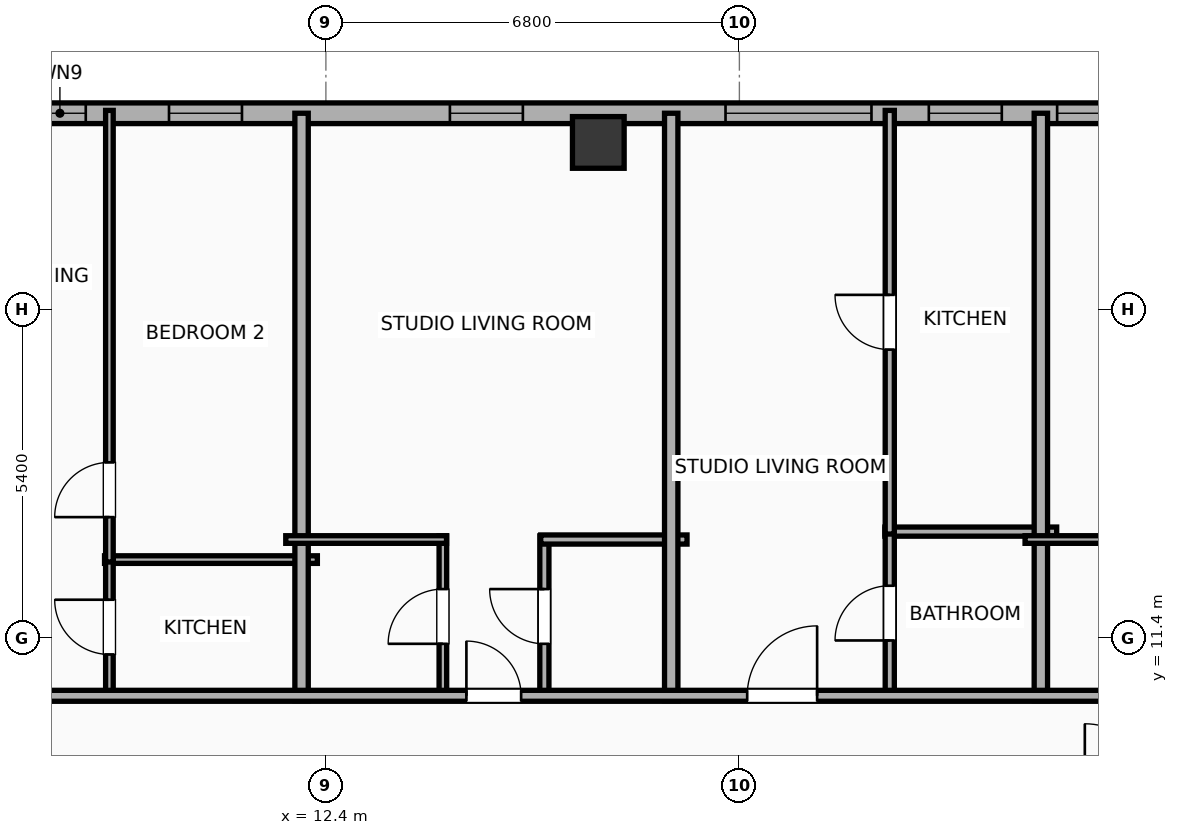
"""IFC4 building model, lengths in metres.
Left out: names, types, materials, properties, quantities, classifications, styles, units other than length and angle.
Written with IfcOpenShell. Run it as: python <this file> out.ifc"""

import sys

from ifc_helpers import new_model, si_unit, direction, frame, frame_2d, origin, origin_2d, place, context, subcontext, project, spatial, rectangle, hollow_rectangle, extrude, element, fill, save


model = new_model("IFC4")
c1 = context("Model", 3, precision=1e-05, world=origin(), true_north=direction((0.0, 1.0)))
c2 = subcontext(c1, "Body", "Model", "MODEL_VIEW")
j1 = project(units=[si_unit("LENGTHUNIT", "METRE"), si_unit("PLANEANGLEUNIT", "RADIAN")], contexts=[c1])
p1 = place(None, origin())
s1 = spatial("IfcSite", under=j1, at=p1, CompositionType="ELEMENT")
p2 = place(p1, origin())
s2 = spatial("IfcBuilding", under=s1, at=p2, CompositionType="ELEMENT")
p3 = place(p2, frame((0.0, 0.0, 227.5)))
s3 = spatial("IfcBuildingStorey", under=s2, at=p3, CompositionType="ELEMENT", Elevation=227.5)
p4 = place(p3, frame((16.88, 19.55, 0.0), z_axis=(0.0, 0.0, 1.0), x_axis=(1.0, 0.0, 0.0)))
e1 = element("IfcColumn", 1, at=p4, inside=s3, PredefinedType="COLUMN", context=c2, shape_type="SweptSolid", body=[
    extrude(hollow_rectangle(XDim=0.85, YDim=0.85, WallThickness=0.028, at=origin_2d()), origin(), (0.0, 0.0, 1.0), 3.9),
])
p5 = place(p3, frame((-22.783, 20.03, 0.0), z_axis=(0.0, 0.0, 1.0), x_axis=(1.0, 0.0, 0.0)))
e2 = element("IfcWall", 2, at=p5, inside=s3, PredefinedType="ELEMENTEDWALL", context=c2, shape_type="SweptSolid", body=[
    extrude(rectangle(XDim=49.566, YDim=0.34, at=frame_2d((24.783, 0.0))), origin(), (0.0, 0.0, 1.0), 3.65),
])
p6 = place(p5, frame((25.233, 0.0, 0.75)))
e3 = element("IfcOpeningElement", 3, at=p6, cuts=e2, PredefinedType="OPENING", context=c2, shape_type="SweptSolid", body=[
    extrude(rectangle(XDim=2.4, YDim=2.1, at=frame_2d((1.2, 1.05))), frame((0.0, 0.18, 0.0), z_axis=(0.0, -1.0, 0.0), x_axis=(1.0, 0.0, 0.0)), (0.0, 0.0, 1.0), 0.36),
])
p7 = place(p5, frame((41.756, 0.0, 0.75)))
e4 = element("IfcOpeningElement", 4, at=p7, cuts=e2, PredefinedType="OPENING", context=c2, shape_type="SweptSolid", body=[
    extrude(rectangle(XDim=2.4, YDim=2.1, at=frame_2d((1.2, 1.05))), frame((0.0, 0.18, 0.0), z_axis=(0.0, -1.0, 0.0), x_axis=(1.0, 0.0, 0.0)), (0.0, 0.0, 1.0), 0.36),
])
p8 = place(p5, frame((1.637, 0.0, 0.75)))
e5 = element("IfcOpeningElement", 5, at=p8, cuts=e2, PredefinedType="OPENING", context=c2, shape_type="SweptSolid", body=[
    extrude(rectangle(XDim=1.2, YDim=2.05, at=frame_2d((0.6, 1.025))), frame((0.0, 0.18, 0.0), z_axis=(0.0, -1.0, 0.0), x_axis=(1.0, 0.0, 0.0)), (0.0, 0.0, 1.0), 0.36),
])
p9 = place(p5, frame((8.019, 0.0, 0.75)))
e6 = element("IfcOpeningElement", 6, at=p9, cuts=e2, PredefinedType="OPENING", context=c2, shape_type="SweptSolid", body=[
    extrude(rectangle(XDim=1.2, YDim=2.05, at=frame_2d((0.6, 1.025))), frame((0.0, 0.18, 0.0), z_axis=(0.0, -1.0, 0.0), x_axis=(1.0, 0.0, 0.0)), (0.0, 0.0, 1.0), 0.36),
])
p10 = place(p5, frame((4.524, 0.0, 0.75)))
e7 = element("IfcOpeningElement", 7, at=p10, cuts=e2, PredefinedType="OPENING", context=c2, shape_type="SweptSolid", body=[
    extrude(rectangle(XDim=1.2, YDim=2.05, at=frame_2d((0.6, 1.025))), frame((0.0, 0.18, 0.0), z_axis=(0.0, -1.0, 0.0), x_axis=(1.0, 0.0, 0.0)), (0.0, 0.0, 1.0), 0.36),
])
p11 = place(p5, frame((11.678, 0.0, 0.75)))
e8 = element("IfcOpeningElement", 8, at=p11, cuts=e2, PredefinedType="OPENING", context=c2, shape_type="SweptSolid", body=[
    extrude(rectangle(XDim=1.2, YDim=2.05, at=frame_2d((0.6, 1.025))), frame((0.0, 0.18, 0.0), z_axis=(0.0, -1.0, 0.0), x_axis=(1.0, 0.0, 0.0)), (0.0, 0.0, 1.0), 0.36),
])
p12 = place(p5, frame((17.993, 0.0, 0.75)))
e9 = element("IfcOpeningElement", 9, at=p12, cuts=e2, PredefinedType="OPENING", context=c2, shape_type="SweptSolid", body=[
    extrude(rectangle(XDim=1.2, YDim=2.05, at=frame_2d((0.6, 1.025))), frame((0.0, 0.18, 0.0), z_axis=(0.0, -1.0, 0.0), x_axis=(1.0, 0.0, 0.0)), (0.0, 0.0, 1.0), 0.36),
])
p13 = place(p5, frame((15.138, 0.0, 0.75)))
e10 = element("IfcOpeningElement", 10, at=p13, cuts=e2, PredefinedType="OPENING", context=c2, shape_type="SweptSolid", body=[
    extrude(rectangle(XDim=1.2, YDim=2.05, at=frame_2d((0.6, 1.025))), frame((0.0, 0.18, 0.0), z_axis=(0.0, -1.0, 0.0), x_axis=(1.0, 0.0, 0.0)), (0.0, 0.0, 1.0), 0.36),
])
p14 = place(p5, frame((22.278, 0.0, 0.75)))
e11 = element("IfcOpeningElement", 11, at=p14, cuts=e2, PredefinedType="OPENING", context=c2, shape_type="SweptSolid", body=[
    extrude(rectangle(XDim=1.2, YDim=2.05, at=frame_2d((0.6, 1.025))), frame((0.0, 0.18, 0.0), z_axis=(0.0, -1.0, 0.0), x_axis=(1.0, 0.0, 0.0)), (0.0, 0.0, 1.0), 0.36),
])
p15 = place(p5, frame((30.384, 0.0, 0.75)))
e12 = element("IfcOpeningElement", 12, at=p15, cuts=e2, PredefinedType="OPENING", context=c2, shape_type="SweptSolid", body=[
    extrude(rectangle(XDim=0.85, YDim=2.05, at=frame_2d((0.425, 1.025))), frame((0.0, 0.18, 0.0), z_axis=(0.0, -1.0, 0.0), x_axis=(1.0, 0.0, 0.0)), (0.0, 0.0, 1.0), 0.36),
])
p16 = place(p5, frame((32.603, 0.0, 0.75)))
e13 = element("IfcOpeningElement", 13, at=p16, cuts=e2, PredefinedType="OPENING", context=c2, shape_type="SweptSolid", body=[
    extrude(rectangle(XDim=1.2, YDim=2.05, at=frame_2d((0.6, 1.025))), frame((0.0, 0.18, 0.0), z_axis=(0.0, -1.0, 0.0), x_axis=(1.0, 0.0, 0.0)), (0.0, 0.0, 1.0), 0.36),
])
p17 = place(p5, frame((37.223, 0.0, 0.75)))
e14 = element("IfcOpeningElement", 14, at=p17, cuts=e2, PredefinedType="OPENING", context=c2, shape_type="SweptSolid", body=[
    extrude(rectangle(XDim=1.2, YDim=2.05, at=frame_2d((0.6, 1.025))), frame((0.0, 0.18, 0.0), z_axis=(0.0, -1.0, 0.0), x_axis=(1.0, 0.0, 0.0)), (0.0, 0.0, 1.0), 0.36),
])
p18 = place(p5, frame((45.099, 0.0, 0.75)))
e15 = element("IfcOpeningElement", 15, at=p18, cuts=e2, PredefinedType="OPENING", context=c2, shape_type="SweptSolid", body=[
    extrude(rectangle(XDim=1.2, YDim=2.05, at=frame_2d((0.6, 1.025))), frame((0.0, 0.18, 0.0), z_axis=(0.0, -1.0, 0.0), x_axis=(1.0, 0.0, 0.0)), (0.0, 0.0, 1.0), 0.36),
])
p19 = place(p5, frame((47.209, 0.0, 0.75)))
e16 = element("IfcOpeningElement", 16, at=p19, cuts=e2, PredefinedType="OPENING", context=c2, shape_type="SweptSolid", body=[
    extrude(rectangle(XDim=1.2, YDim=2.05, at=frame_2d((0.6, 1.025))), frame((0.0, 0.18, 0.0), z_axis=(0.0, -1.0, 0.0), x_axis=(1.0, 0.0, 0.0)), (0.0, 0.0, 1.0), 0.36),
])
p20 = place(p3, frame((8.76, 12.69, 0.0), z_axis=(0.0, 0.0, 1.0), x_axis=(1.0, 0.0, 0.0)))
e17 = element("IfcWall", 17, at=p20, inside=s3, PredefinedType="PARTITIONING", context=c2, shape_type="SweptSolid", body=[
    extrude(rectangle(XDim=3.5, YDim=0.125, at=frame_2d((1.75, 0.0))), origin(), (0.0, 0.0, 1.0), 3.65),
])
p21 = place(p3, frame((8.84, 10.43, 0.0), z_axis=(0.0, 0.0, 1.0), x_axis=(0.0, 1.0, 0.0)))
e18 = element("IfcWall", 18, at=p21, inside=s3, PredefinedType="PARTITIONING", context=c2, shape_type="SweptSolid", body=[
    extrude(rectangle(XDim=2.3, YDim=0.125, at=frame_2d((1.15, 0.0))), origin(), (0.0, 0.0, 1.0), 3.65),
])
p22 = place(p21, frame((0.7, 0.0, 0.0)))
e19 = element("IfcOpeningElement", 19, at=p22, cuts=e18, PredefinedType="OPENING", context=c2, shape_type="SweptSolid", body=[
    extrude(rectangle(XDim=0.9, YDim=2.05, at=frame_2d((0.45, 1.025))), frame((0.0, 0.073, 0.0), z_axis=(0.0, -1.0, 0.0), x_axis=(1.0, 0.0, 0.0)), (0.0, 0.0, 1.0), 0.145),
])
p23 = place(p3, frame((8.84, 12.65, 0.0), z_axis=(0.0, 0.0, 1.0), x_axis=(0.0, 1.0, 0.0)))
e20 = element("IfcWall", 20, at=p23, inside=s3, PredefinedType="PARTITIONING", context=c2, shape_type="SweptSolid", body=[
    extrude(rectangle(XDim=7.427, YDim=0.125, at=frame_2d((3.713, 0.0))), origin(), (0.0, 0.0, 1.0), 3.65),
])
p24 = place(p23, frame((0.738, 0.0, 0.0)))
e21 = element("IfcOpeningElement", 21, at=p24, cuts=e20, PredefinedType="OPENING", context=c2, shape_type="SweptSolid", body=[
    extrude(rectangle(XDim=0.9, YDim=2.05, at=frame_2d((0.45, 1.025))), frame((0.0, 0.073, 0.0), z_axis=(0.0, -1.0, 0.0), x_axis=(1.0, 0.0, 0.0)), (0.0, 0.0, 1.0), 0.145),
])
p25 = place(p3, frame((12.0, 10.37, 0.0), z_axis=(0.0, 0.0, 1.0), x_axis=(0.0, 1.0, 0.0)))
e22 = element("IfcWall", 22, at=p25, inside=s3, PredefinedType="PARTITIONING", context=c2, shape_type="SweptSolid", body=[
    extrude(rectangle(XDim=9.66, YDim=0.22, at=frame_2d((4.83, 0.0))), origin(), (0.0, 0.0, 1.0), 3.65),
])
p26 = place(p3, frame((14.324, 10.43, 0.0), z_axis=(0.0, 0.0, 1.0), x_axis=(0.0, 1.0, 0.0)))
e23 = element("IfcWall", 23, at=p26, inside=s3, PredefinedType="PARTITIONING", context=c2, shape_type="SweptSolid", body=[
    extrude(rectangle(XDim=2.65, YDim=0.125, at=frame_2d((1.325, 0.0))), origin(), (0.0, 0.0, 1.0), 3.65),
])
p27 = place(p26, frame((0.875, 0.0, 0.0)))
e24 = element("IfcOpeningElement", 24, at=p27, cuts=e23, PredefinedType="OPENING", context=c2, shape_type="SweptSolid", body=[
    extrude(rectangle(XDim=0.9, YDim=2.05, at=frame_2d((0.45, 1.025))), frame((0.0, 0.073, 0.0), z_axis=(0.0, -1.0, 0.0), x_axis=(1.0, 0.0, 0.0)), (0.0, 0.0, 1.0), 0.145),
])
p28 = place(p3, frame((15.993, 10.43, 0.0), z_axis=(0.0, 0.0, 1.0), x_axis=(0.0, 1.0, 0.0)))
e25 = element("IfcWall", 25, at=p28, inside=s3, PredefinedType="PLUMBINGWALL", context=c2, shape_type="SweptSolid", body=[
    extrude(rectangle(XDim=2.65, YDim=0.15, at=frame_2d((1.325, 0.0))), origin(), (0.0, 0.0, 1.0), 3.09),
])
p29 = place(p28, frame((0.875, 0.0, 0.0)))
e26 = element("IfcOpeningElement", 26, at=p29, cuts=e25, PredefinedType="OPENING", context=c2, shape_type="SweptSolid", body=[
    extrude(rectangle(XDim=0.9, YDim=2.05, at=frame_2d((0.45, 1.025))), frame((0.0, 0.085, 0.0), z_axis=(0.0, -1.0, 0.0), x_axis=(1.0, 0.0, 0.0)), (0.0, 0.0, 1.0), 0.17),
])
p30 = place(p3, frame((11.74, 13.02, 0.0), z_axis=(0.0, 0.0, 1.0), x_axis=(1.0, 0.0, 0.0)))
e27 = element("IfcWall", 27, at=p30, inside=s3, PredefinedType="PARTITIONING", context=c2, shape_type="SweptSolid", body=[
    extrude(rectangle(XDim=2.644, YDim=0.125, at=frame_2d((1.322, 0.0))), origin(), (0.0, 0.0, 1.0), 3.65),
])
p31 = place(p3, frame((15.933, 13.02, 0.0), z_axis=(0.0, 0.0, 1.0), x_axis=(1.0, 0.0, 0.0)))
e28 = element("IfcWall", 28, at=p31, inside=s3, PredefinedType="PLUMBINGWALL", context=c2, shape_type="SweptSolid", body=[
    extrude(rectangle(XDim=2.406, YDim=0.15, at=frame_2d((1.203, 0.0))), origin(), (0.0, 0.0, 1.0), 3.65),
])
p32 = place(p3, frame((18.079, 10.37, 0.0), z_axis=(0.0, 0.0, 1.0), x_axis=(0.0, 1.0, 0.0)))
e29 = element("IfcWall", 29, at=p32, inside=s3, PredefinedType="PARTITIONING", context=c2, shape_type="SweptSolid", body=[
    extrude(rectangle(XDim=9.66, YDim=0.22, at=frame_2d((4.83, 0.0))), origin(), (0.0, 0.0, 1.0), 3.65),
])
p33 = place(p3, frame((21.593, 13.15, 0.0), z_axis=(0.0, 0.0, 1.0), x_axis=(1.0, 0.0, 0.0)))
e30 = element("IfcWall", 30, at=p33, inside=s3, PredefinedType="PLUMBINGWALL", context=c2, shape_type="SweptSolid", body=[
    extrude(rectangle(XDim=2.825, YDim=0.15, at=frame_2d((1.413, 0.0))), origin(), (0.0, 0.0, 1.0), 3.65),
])
p34 = place(p3, frame((21.673, 10.43, 0.0), z_axis=(0.0, 0.0, 1.0), x_axis=(0.0, 1.0, 0.0)))
e31 = element("IfcWall", 31, at=p34, inside=s3, PredefinedType="PLUMBINGWALL", context=c2, shape_type="SweptSolid", body=[
    extrude(rectangle(XDim=2.76, YDim=0.15, at=frame_2d((1.38, 0.0))), origin(), (0.0, 0.0, 1.0), 3.65),
])
p35 = place(p34, frame((0.93, 0.0, 0.0)))
e32 = element("IfcOpeningElement", 32, at=p35, cuts=e31, PredefinedType="OPENING", context=c2, shape_type="SweptSolid", body=[
    extrude(rectangle(XDim=0.9, YDim=2.05, at=frame_2d((0.45, 1.025))), frame((0.0, 0.085, 0.0), z_axis=(0.0, -1.0, 0.0), x_axis=(1.0, 0.0, 0.0)), (0.0, 0.0, 1.0), 0.17),
])
p36 = place(p3, frame((21.673, 13.11, 0.0), z_axis=(0.0, 0.0, 1.0), x_axis=(0.0, 1.0, 0.0)))
e33 = element("IfcWall", 33, at=p36, inside=s3, PredefinedType="PLUMBINGWALL", context=c2, shape_type="SweptSolid", body=[
    extrude(rectangle(XDim=6.967, YDim=0.15, at=frame_2d((3.483, 0.0))), origin(), (0.0, 0.0, 1.0), 3.65),
])
p37 = place(p36, frame((3.033, 0.0, 0.0)))
e34 = element("IfcOpeningElement", 34, at=p37, cuts=e33, PredefinedType="OPENING", context=c2, shape_type="SweptSolid", body=[
    extrude(rectangle(XDim=0.9, YDim=2.05, at=frame_2d((0.45, 1.025))), frame((0.0, 0.085, 0.0), z_axis=(0.0, -1.0, 0.0), x_axis=(1.0, 0.0, 0.0)), (0.0, 0.0, 1.0), 0.17),
])
p38 = place(p3, frame((24.158, 10.37, 0.0), z_axis=(0.0, 0.0, 1.0), x_axis=(0.0, 1.0, 0.0)))
e35 = element("IfcWall", 35, at=p38, inside=s3, PredefinedType="PARTITIONING", context=c2, shape_type="SweptSolid", body=[
    extrude(rectangle(XDim=9.66, YDim=0.22, at=frame_2d((4.83, 0.0))), origin(), (0.0, 0.0, 1.0), 3.65),
])
p39 = place(p3, frame((23.898, 13.02, 0.0), z_axis=(0.0, 0.0, 1.0), x_axis=(1.0, 0.0, 0.0)))
e36 = element("IfcWall", 36, at=p39, inside=s3, PredefinedType="PARTITIONING", context=c2, shape_type="SweptSolid", body=[
    extrude(rectangle(XDim=2.667, YDim=0.125, at=frame_2d((1.333, 0.0))), origin(), (0.0, 0.0, 1.0), 3.65),
])
p40 = place(p3, frame((-26.23, 10.45, 0.0), z_axis=(0.0, 0.0, 1.0), x_axis=(1.0, 0.0, 0.0)))
e37 = element("IfcWall", 37, at=p40, inside=s3, PredefinedType="PARTITIONING", context=c2, shape_type="SweptSolid", body=[
    extrude(rectangle(XDim=56.46, YDim=0.18, at=frame_2d((28.23, 0.0))), origin(), (0.0, 0.0, 1.0), 3.65),
])
p41 = place(p40, frame((3.072, 0.0, 0.0)))
e38 = element("IfcOpeningElement", 38, at=p41, cuts=e37, PredefinedType="OPENING", context=c2, shape_type="SweptSolid", body=[
    extrude(rectangle(XDim=1.15, YDim=2.05, at=frame_2d((0.575, 1.025))), frame((0.0, 0.1, 0.0), z_axis=(0.0, -1.0, 0.0), x_axis=(1.0, 0.0, 0.0)), (0.0, 0.0, 1.0), 0.2),
])
p42 = place(p40, frame((12.146, 0.0, 0.0)))
e39 = element("IfcOpeningElement", 39, at=p42, cuts=e37, PredefinedType="OPENING", context=c2, shape_type="SweptSolid", body=[
    extrude(rectangle(XDim=1.15, YDim=2.05, at=frame_2d((0.575, 1.025))), frame((0.0, 0.1, 0.0), z_axis=(0.0, -1.0, 0.0), x_axis=(1.0, 0.0, 0.0)), (0.0, 0.0, 1.0), 0.2),
])
p43 = place(p40, frame((22.302, 0.0, 0.0)))
e40 = element("IfcOpeningElement", 40, at=p43, cuts=e37, PredefinedType="OPENING", context=c2, shape_type="SweptSolid", body=[
    extrude(rectangle(XDim=1.15, YDim=2.05, at=frame_2d((0.575, 1.025))), frame((0.0, 0.1, 0.0), z_axis=(0.0, -1.0, 0.0), x_axis=(1.0, 0.0, 0.0)), (0.0, 0.0, 1.0), 0.2),
])
p44 = place(p40, frame((32.601, 0.0, 0.0)))
e41 = element("IfcOpeningElement", 41, at=p44, cuts=e37, PredefinedType="OPENING", context=c2, shape_type="SweptSolid", body=[
    extrude(rectangle(XDim=1.15, YDim=2.05, at=frame_2d((0.575, 1.025))), frame((0.0, 0.1, 0.0), z_axis=(0.0, -1.0, 0.0), x_axis=(1.0, 0.0, 0.0)), (0.0, 0.0, 1.0), 0.2),
])
p45 = place(p40, frame((40.941, 0.0, 0.0)))
e42 = element("IfcOpeningElement", 42, at=p45, cuts=e37, PredefinedType="OPENING", context=c2, shape_type="SweptSolid", body=[
    extrude(rectangle(XDim=0.9, YDim=2.05, at=frame_2d((0.45, 1.025))), frame((0.0, 0.1, 0.0), z_axis=(0.0, -1.0, 0.0), x_axis=(1.0, 0.0, 0.0)), (0.0, 0.0, 1.0), 0.2),
])
p46 = place(p40, frame((45.559, 0.0, 0.0)))
e43 = element("IfcOpeningElement", 43, at=p46, cuts=e37, PredefinedType="OPENING", context=c2, shape_type="SweptSolid", body=[
    extrude(rectangle(XDim=1.15, YDim=2.05, at=frame_2d((0.575, 1.025))), frame((0.0, 0.1, 0.0), z_axis=(0.0, -1.0, 0.0), x_axis=(1.0, 0.0, 0.0)), (0.0, 0.0, 1.0), 0.2),
])
p47 = place(p40, frame((53.125, 0.0, 0.0)))
e44 = element("IfcOpeningElement", 44, at=p47, cuts=e37, PredefinedType="OPENING", context=c2, shape_type="SweptSolid", body=[
    extrude(rectangle(XDim=0.9, YDim=2.05, at=frame_2d((0.45, 1.025))), frame((0.0, 0.1, 0.0), z_axis=(0.0, -1.0, 0.0), x_axis=(1.0, 0.0, 0.0)), (0.0, 0.0, 1.0), 0.2),
])
p48 = place(p7, origin())
e45 = element("IfcWindow", 45, at=p48, inside=s3, PartitioningType="SINGLE_PANEL", PredefinedType="WINDOW", context=c2, shape_type="SweptSolid", body=[
    extrude(rectangle(XDim=2.4, YDim=2.1, at=frame_2d((1.2, 1.05))), frame((0.0, 0.03, 0.0), z_axis=(0.0, -1.0, 0.0), x_axis=(1.0, 0.0, 0.0)), (0.0, 0.0, 1.0), 0.06),
])
fill(e4, e45)
p49 = place(p15, origin())
e46 = element("IfcWindow", 46, at=p49, inside=s3, PartitioningType="SINGLE_PANEL", PredefinedType="WINDOW", context=c2, shape_type="SweptSolid", body=[
    extrude(rectangle(XDim=0.85, YDim=2.05, at=frame_2d((0.425, 1.025))), frame((0.0, 0.03, 0.0), z_axis=(0.0, -1.0, 0.0), x_axis=(1.0, 0.0, 0.0)), (0.0, 0.0, 1.0), 0.06),
])
fill(e12, e46)
p50 = place(p16, origin())
e47 = element("IfcWindow", 47, at=p50, inside=s3, PartitioningType="SINGLE_PANEL", PredefinedType="WINDOW", context=c2, shape_type="SweptSolid", body=[
    extrude(rectangle(XDim=1.2, YDim=2.05, at=frame_2d((0.6, 1.025))), frame((0.0, 0.03, 0.0), z_axis=(0.0, -1.0, 0.0), x_axis=(1.0, 0.0, 0.0)), (0.0, 0.0, 1.0), 0.06),
])
fill(e13, e47)
p51 = place(p17, origin())
e48 = element("IfcWindow", 48, at=p51, inside=s3, PartitioningType="SINGLE_PANEL", PredefinedType="WINDOW", context=c2, shape_type="SweptSolid", body=[
    extrude(rectangle(XDim=1.2, YDim=2.05, at=frame_2d((0.6, 1.025))), frame((0.0, 0.03, 0.0), z_axis=(0.0, -1.0, 0.0), x_axis=(1.0, 0.0, 0.0)), (0.0, 0.0, 1.0), 0.06),
])
fill(e14, e48)
p52 = place(p18, origin())
e49 = element("IfcWindow", 49, at=p52, inside=s3, PartitioningType="SINGLE_PANEL", PredefinedType="WINDOW", context=c2, shape_type="SweptSolid", body=[
    extrude(rectangle(XDim=1.2, YDim=2.05, at=frame_2d((0.6, 1.025))), frame((0.0, 0.03, 0.0), z_axis=(0.0, -1.0, 0.0), x_axis=(1.0, 0.0, 0.0)), (0.0, 0.0, 1.0), 0.06),
])
fill(e15, e49)
p53 = place(p19, origin())
e50 = element("IfcWindow", 50, at=p53, inside=s3, PartitioningType="SINGLE_PANEL", PredefinedType="WINDOW", context=c2, shape_type="SweptSolid", body=[
    extrude(rectangle(XDim=1.2, YDim=2.05, at=frame_2d((0.6, 1.025))), frame((0.0, 0.03, 0.0), z_axis=(0.0, -1.0, 0.0), x_axis=(1.0, 0.0, 0.0)), (0.0, 0.0, 1.0), 0.06),
])
fill(e16, e50)
p54 = place(p22, origin())
e51 = element("IfcDoor", 51, at=p54, inside=s3, OperationType="SINGLE_SWING_RIGHT", PredefinedType="DOOR", context=c2, shape_type="SweptSolid", body=[
    extrude(rectangle(XDim=0.9, YDim=2.05, at=frame_2d((0.45, 1.025))), frame((0.0, 0.025, 0.0), z_axis=(0.0, -1.0, 0.0), x_axis=(1.0, 0.0, 0.0)), (0.0, 0.0, 1.0), 0.05),
])
fill(e19, e51)
p55 = place(p24, origin())
e52 = element("IfcDoor", 52, at=p55, inside=s3, OperationType="SINGLE_SWING_LEFT", PredefinedType="DOOR", context=c2, shape_type="SweptSolid", body=[
    extrude(rectangle(XDim=0.9, YDim=2.05, at=frame_2d((0.45, 1.025))), frame((0.0, 0.025, 0.0), z_axis=(0.0, -1.0, 0.0), x_axis=(1.0, 0.0, 0.0)), (0.0, 0.0, 1.0), 0.05),
])
fill(e21, e52)
p56 = place(p27, origin())
e53 = element("IfcDoor", 53, at=p56, inside=s3, OperationType="SINGLE_SWING_LEFT", PredefinedType="DOOR", context=c2, shape_type="SweptSolid", body=[
    extrude(rectangle(XDim=0.9, YDim=2.05, at=frame_2d((0.45, 1.025))), frame((0.0, 0.025, 0.0), z_axis=(0.0, -1.0, 0.0), x_axis=(1.0, 0.0, 0.0)), (0.0, 0.0, 1.0), 0.05),
])
fill(e24, e53)
p57 = place(p29, origin())
e54 = element("IfcDoor", 54, at=p57, inside=s3, OperationType="SINGLE_SWING_RIGHT", PredefinedType="DOOR", context=c2, shape_type="SweptSolid", body=[
    extrude(rectangle(XDim=0.9, YDim=2.05, at=frame_2d((0.45, 1.025))), frame((0.0, 0.025, 0.0), z_axis=(0.0, -1.0, 0.0), x_axis=(1.0, 0.0, 0.0)), (0.0, 0.0, 1.0), 0.05),
])
fill(e26, e54)
p58 = place(p35, origin())
e55 = element("IfcDoor", 55, at=p58, inside=s3, OperationType="SINGLE_SWING_LEFT", PredefinedType="DOOR", context=c2, shape_type="SweptSolid", body=[
    extrude(rectangle(XDim=0.9, YDim=2.05, at=frame_2d((0.45, 1.025))), frame((0.0, 0.025, 0.0), z_axis=(0.0, -1.0, 0.0), x_axis=(1.0, 0.0, 0.0)), (0.0, 0.0, 1.0), 0.05),
])
fill(e32, e55)
p59 = place(p37, origin())
e56 = element("IfcDoor", 56, at=p59, inside=s3, OperationType="SINGLE_SWING_RIGHT", PredefinedType="DOOR", context=c2, shape_type="SweptSolid", body=[
    extrude(rectangle(XDim=0.9, YDim=2.05, at=frame_2d((0.45, 1.025))), frame((0.0, 0.025, 0.0), z_axis=(0.0, -1.0, 0.0), x_axis=(1.0, 0.0, 0.0)), (0.0, 0.0, 1.0), 0.05),
])
fill(e34, e56)
p60 = place(p45, origin())
e57 = element("IfcDoor", 57, at=p60, inside=s3, OperationType="SINGLE_SWING_LEFT", PredefinedType="DOOR", context=c2, shape_type="SweptSolid", body=[
    extrude(rectangle(XDim=0.9, YDim=2.05, at=frame_2d((0.45, 1.025))), frame((0.0, 0.025, 0.0), z_axis=(0.0, -1.0, 0.0), x_axis=(1.0, 0.0, 0.0)), (0.0, 0.0, 1.0), 0.05),
])
fill(e42, e57)
p61 = place(p46, origin())
e58 = element("IfcDoor", 58, at=p61, inside=s3, OperationType="SINGLE_SWING_RIGHT", PredefinedType="DOOR", context=c2, shape_type="SweptSolid", body=[
    extrude(rectangle(XDim=1.15, YDim=2.05, at=frame_2d((0.575, 1.025))), frame((0.0, 0.025, 0.0), z_axis=(0.0, -1.0, 0.0), x_axis=(1.0, 0.0, 0.0)), (0.0, 0.0, 1.0), 0.05),
])
fill(e43, e58)
save(model, sys.argv[1])
